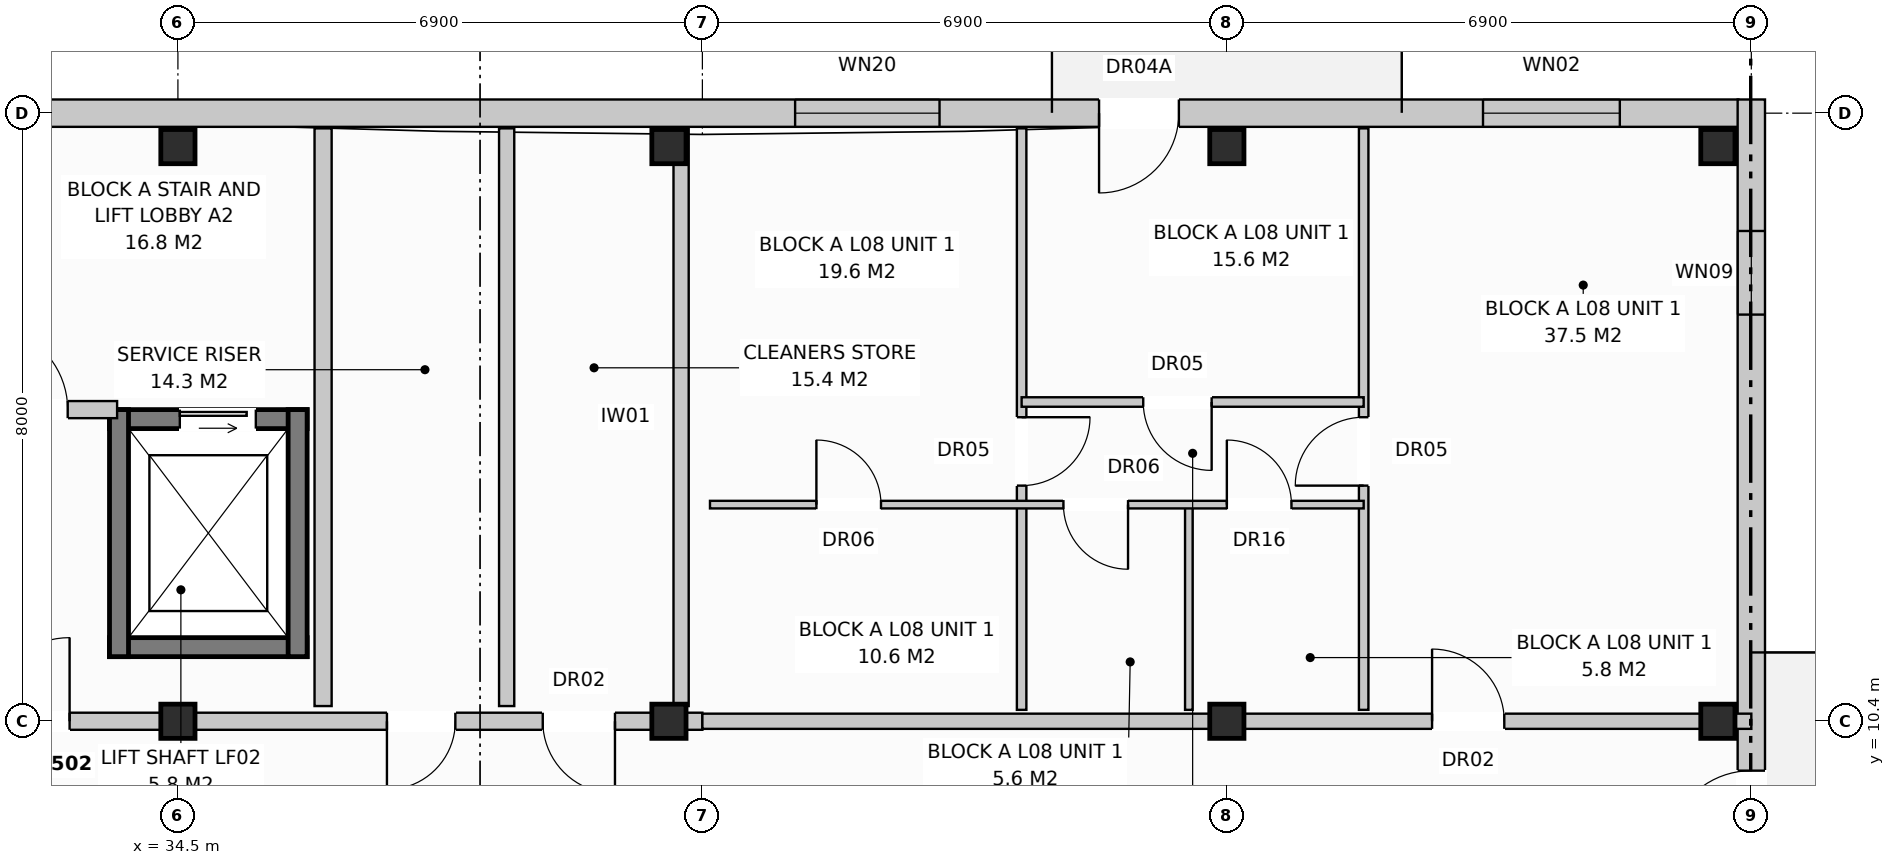
"""IFC4 building model, lengths in metres.
Left out: names, types, materials, properties, quantities, classifications, styles, units other than length and angle.
Written with IfcOpenShell. Run it as: python <this file> out.ifc"""

import sys

from ifc_helpers import new_model, si_unit, direction, frame, frame_2d, origin, origin_with_axes, origin_2d, place, context, subcontext, project, spatial, rectangle, extrude, element, fill, save


model = new_model("IFC4")
c1 = context("Model", 3, precision=1e-05, world=origin(), true_north=direction((0.0, 1.0)))
c2 = subcontext(c1, "Body", "Model", "MODEL_VIEW")
j1 = project(units=[si_unit("LENGTHUNIT", "METRE"), si_unit("PLANEANGLEUNIT", "RADIAN")], contexts=[c1])
p1 = place(None, origin())
s1 = spatial("IfcSite", under=j1, at=p1, CompositionType="ELEMENT")
p2 = place(p1, origin())
s2 = spatial("IfcBuilding", under=s1, at=p2, CompositionType="ELEMENT")
p3 = place(p2, frame((0.0, 0.0, 27.2)))
s3 = spatial("IfcBuildingStorey", under=s2, at=p3, CompositionType="ELEMENT", Elevation=27.2)
for number, where, z_axis, x_axis in (
    (1, (34.5, 10.4, 0.0), (0.0, 0.0, 1.0), (1.0, 0.0, 0.0)),
    (2, (34.5, 17.96, 0.0), (0.0, 0.0, 1.0), (1.0, 0.0, 0.0)),
    (3, (40.96, 10.4, 0.0), (0.0, 0.0, 1.0), (1.0, 0.0, 0.0)),
    (4, (40.96, 17.96, 0.0), (0.0, 0.0, 1.0), (1.0, 0.0, 0.0)),
    (5, (48.3, 10.4, 0.0), (0.0, 0.0, 1.0), (1.0, 0.0, 0.0)),
    (6, (48.3, 17.96, 0.0), (0.0, 0.0, 1.0), (1.0, 0.0, 0.0)),
    (7, (54.76, 10.4, 0.0), (0.0, 0.0, 1.0), (1.0, 0.0, 0.0)),
    (8, (54.76, 17.96, 0.0), (0.0, 0.0, 1.0), (1.0, 0.0, 0.0)),
):
    element("IfcColumn", number, at=place(p3, frame(where, z_axis=z_axis, x_axis=x_axis)), inside=s3, PredefinedType="COLUMN", context=c2, shape_type="SweptSolid", body=[
        extrude(rectangle(XDim=0.45, YDim=0.45, at=origin_2d()), origin(), (0.0, 0.0, 1.0), 3.2),
    ])
p4 = place(p3, frame((31.35, 18.4, 0.0), z_axis=(0.0, 0.0, 1.0), x_axis=(1.0, 0.0, 0.0)))
e9 = element("IfcWall", 9, at=p4, inside=s3, PredefinedType="STANDARD", context=c2, shape_type="SweptSolid", body=[
    extrude(rectangle(XDim=23.68, YDim=0.36, at=frame_2d((11.84, 0.0))), origin(), (0.0, 0.0, 1.0), 2.96),
])
p5 = place(p4, frame((15.269, 0.0, 0.0)))
e10 = element("IfcOpeningElement", 10, at=p5, cuts=e9, PredefinedType="OPENING", context=c2, shape_type="SweptSolid", body=[
    extrude(rectangle(XDim=1.05, YDim=2.12, at=frame_2d((0.525, 1.06))), frame((0.0, 0.192, 0.0), z_axis=(0.0, -1.0, 0.0), x_axis=(1.0, 0.0, 0.0)), (0.0, 0.0, 1.0), 0.384),
])
p6 = place(p4, frame((11.27, 0.0, 0.8)))
e11 = element("IfcOpeningElement", 11, at=p6, cuts=e9, PredefinedType="OPENING", context=c2, shape_type="SweptSolid", body=[
    extrude(rectangle(XDim=1.9, YDim=1.85, at=frame_2d((0.95, 0.925))), frame((0.0, 0.192, 0.0), z_axis=(0.0, -1.0, 0.0), x_axis=(1.0, 0.0, 0.0)), (0.0, 0.0, 1.0), 0.384),
])
p7 = place(p4, frame((20.32, 0.0, 0.8)))
e12 = element("IfcOpeningElement", 12, at=p7, cuts=e9, PredefinedType="OPENING", context=c2, shape_type="SweptSolid", body=[
    extrude(rectangle(XDim=1.8, YDim=1.7, at=frame_2d((0.9, 0.85))), frame((0.0, 0.192, 0.0), z_axis=(0.0, -1.0, 0.0), x_axis=(1.0, 0.0, 0.0)), (0.0, 0.0, 1.0), 0.384),
])
p8 = place(p3, frame((55.2, -0.18, 0.0), z_axis=(0.0, 0.0, 1.0), x_axis=(0.0, 1.0, 0.0)))
e13 = element("IfcWall", 13, at=p8, inside=s3, PredefinedType="STANDARD", context=c2, shape_type="SweptSolid", body=[
    extrude(rectangle(XDim=18.76, YDim=0.36, at=frame_2d((9.38, 0.0))), origin(), (0.0, 0.0, 1.0), 2.96),
])
p9 = place(p8, frame((8.83, 0.0, 0.0)))
e14 = element("IfcOpeningElement", 14, at=p9, cuts=e13, PredefinedType="OPENING", context=c2, shape_type="SweptSolid", body=[
    extrude(rectangle(XDim=1.1, YDim=2.1, at=frame_2d((0.55, 1.05))), frame((0.0, 0.192, 0.0), z_axis=(0.0, -1.0, 0.0), x_axis=(1.0, 0.0, 0.0)), (0.0, 0.0, 1.0), 0.384),
])
p10 = place(p8, frame((1.73, 0.0, 0.72)))
e15 = element("IfcOpeningElement", 15, at=p10, cuts=e13, PredefinedType="OPENING", context=c2, shape_type="SweptSolid", body=[
    extrude(rectangle(XDim=1.1, YDim=1.5, at=frame_2d((0.55, 0.75))), frame((0.0, 0.192, 0.0), z_axis=(0.0, -1.0, 0.0), x_axis=(1.0, 0.0, 0.0)), (0.0, 0.0, 1.0), 0.384),
])
p11 = place(p8, frame((15.93, 0.0, 0.72)))
e16 = element("IfcOpeningElement", 16, at=p11, cuts=e13, PredefinedType="OPENING", context=c2, shape_type="SweptSolid", body=[
    extrude(rectangle(XDim=1.1, YDim=1.5, at=frame_2d((0.55, 0.75))), frame((0.0, 0.192, 0.0), z_axis=(0.0, -1.0, 0.0), x_axis=(1.0, 0.0, 0.0)), (0.0, 0.0, 1.0), 0.384),
])
p12 = place(p3, frame((33.6, 14.375, 0.0), z_axis=(0.0, 0.0, 1.0), x_axis=(1.0, 0.0, 0.0)))
e17 = element("IfcWall", 17, at=p12, inside=s3, PredefinedType="SHEAR", context=c2, shape_type="SweptSolid", body=[
    extrude(rectangle(XDim=2.6, YDim=0.25, at=frame_2d((1.3, 0.0))), origin(), (0.0, 0.0, 1.0), 2.96),
])
p13 = place(p12, frame((0.925, 0.0, 0.0)))
e18 = element("IfcOpeningElement", 18, at=p13, cuts=e17, PredefinedType="OPENING", context=c2, shape_type="SweptSolid", body=[
    extrude(rectangle(XDim=1.0, YDim=2.1, at=frame_2d((0.5, 1.05))), frame((0.0, 0.137, 0.0), z_axis=(0.0, -1.0, 0.0), x_axis=(1.0, 0.0, 0.0)), (0.0, 0.0, 1.0), 0.274),
])
p14 = place(p3, frame((33.6, 11.375, 0.0), z_axis=(0.0, 0.0, 1.0), x_axis=(1.0, 0.0, 0.0)))
e19 = element("IfcWall", 19, at=p14, inside=s3, PredefinedType="SHEAR", context=c2, shape_type="SweptSolid", body=[
    extrude(rectangle(XDim=2.6, YDim=0.25, at=frame_2d((1.3, 0.0))), origin(), (0.0, 0.0, 1.0), 2.96),
])
for number, where, z_axis, x_axis in (
    (20, (33.725, 11.25, 0.0), (0.0, 0.0, 1.0), (0.0, 1.0, 0.0)),
    (21, (36.075, 11.25, 0.0), (0.0, 0.0, 1.0), (0.0, 1.0, 0.0)),
):
    element("IfcWall", number, at=place(p3, frame(where, z_axis=z_axis, x_axis=x_axis)), inside=s3, PredefinedType="SHEAR", context=c2, shape_type="SweptSolid", body=[
        extrude(rectangle(XDim=3.25, YDim=0.25, at=frame_2d((1.625, 0.0))), origin(), (0.0, 0.0, 1.0), 2.96),
    ])
p15 = place(p3, frame((36.41, 10.6, 0.0), z_axis=(0.0, 0.0, 1.0), x_axis=(0.0, 1.0, 0.0)))
e22 = element("IfcWall", 22, at=p15, inside=s3, PredefinedType="PARTITIONING", context=c2, shape_type="SweptSolid", body=[
    extrude(rectangle(XDim=7.6, YDim=0.225, at=frame_2d((3.8, 0.0))), origin(), (0.0, 0.0, 1.0), 2.59),
])
p16 = place(p3, frame((31.5, 14.5, 0.0), z_axis=(0.0, 0.0, 1.0), x_axis=(1.0, 0.0, 0.0)))
e23 = element("IfcWall", 23, at=p16, inside=s3, PredefinedType="PARTITIONING", context=c2, shape_type="SweptSolid", body=[
    extrude(rectangle(XDim=2.2, YDim=0.225, at=frame_2d((1.1, 0.0))), origin(), (0.0, 0.0, 1.0), 2.96),
])
p17 = place(p16, frame((0.45, 0.0, 0.0)))
e24 = element("IfcOpeningElement", 24, at=p17, cuts=e23, PredefinedType="OPENING", context=c2, shape_type="SweptSolid", body=[
    extrude(rectangle(XDim=1.1, YDim=2.15, at=frame_2d((0.55, 1.075))), frame((0.0, 0.125, 0.0), z_axis=(0.0, -1.0, 0.0), x_axis=(1.0, 0.0, 0.0)), (0.0, 0.0, 1.0), 0.249),
])
p18 = place(p3, frame((38.825, 10.6, 0.0), z_axis=(0.0, 0.0, 1.0), x_axis=(0.0, 1.0, 0.0)))
e25 = element("IfcWall", 25, at=p18, inside=s3, PredefinedType="PARTITIONING", context=c2, shape_type="SweptSolid", body=[
    extrude(rectangle(XDim=7.6, YDim=0.2, at=frame_2d((3.8, 0.0))), origin(), (0.0, 0.0, 1.0), 2.96),
])
p19 = place(p3, frame((41.12, 10.6, 0.0), z_axis=(0.0, 0.0, 1.0), x_axis=(0.0, 1.0, 0.0)))
e26 = element("IfcWall", 26, at=p19, inside=s3, PredefinedType="PARTITIONING", context=c2, shape_type="SweptSolid", body=[
    extrude(rectangle(XDim=7.6, YDim=0.2, at=frame_2d((3.8, 0.0))), origin(), (0.0, 0.0, 1.0), 2.4),
])
p20 = place(p3, frame((31.5, 10.4, 0.0), z_axis=(0.0, 0.0, 1.0), x_axis=(1.0, 0.0, 0.0)))
e27 = element("IfcWall", 27, at=p20, inside=s3, PredefinedType="PARTITIONING", context=c2, shape_type="SweptSolid", body=[
    extrude(rectangle(XDim=9.9, YDim=0.225, at=frame_2d((4.95, 0.0))), origin(), (0.0, 0.0, 1.0), 2.4),
])
p21 = place(p20, frame((0.475, 0.0, 0.0)))
e28 = element("IfcOpeningElement", 28, at=p21, cuts=e27, PredefinedType="OPENING", context=c2, shape_type="SweptSolid", body=[
    extrude(rectangle(XDim=1.1, YDim=2.15, at=frame_2d((0.55, 1.075))), frame((0.0, 0.125, 0.0), z_axis=(0.0, -1.0, 0.0), x_axis=(1.0, 0.0, 0.0)), (0.0, 0.0, 1.0), 0.249),
])
p22 = place(p20, frame((5.75, 0.0, 0.0)))
e29 = element("IfcOpeningElement", 29, at=p22, cuts=e27, PredefinedType="OPENING", context=c2, shape_type="SweptSolid", body=[
    extrude(rectangle(XDim=0.9, YDim=2.1, at=frame_2d((0.45, 1.05))), frame((0.0, 0.125, 0.0), z_axis=(0.0, -1.0, 0.0), x_axis=(1.0, 0.0, 0.0)), (0.0, 0.0, 1.0), 0.249),
])
p23 = place(p20, frame((7.8, 0.0, 0.0)))
e30 = element("IfcOpeningElement", 30, at=p23, cuts=e27, PredefinedType="OPENING", context=c2, shape_type="SweptSolid", body=[
    extrude(rectangle(XDim=0.95, YDim=2.15, at=frame_2d((0.475, 1.075))), frame((0.0, 0.125, 0.0), z_axis=(0.0, -1.0, 0.0), x_axis=(1.0, 0.0, 0.0)), (0.0, 0.0, 1.0), 0.249),
])
p24 = place(p3, frame((41.4, 10.4, 0.0), z_axis=(0.0, 0.0, 1.0), x_axis=(1.0, 0.0, 0.0)))
e31 = element("IfcWall", 31, at=p24, inside=s3, PredefinedType="PARTITIONING", context=c2, shape_type="SweptSolid", body=[
    extrude(rectangle(XDim=13.8, YDim=0.2, at=frame_2d((6.9, 0.0))), origin(), (0.0, 0.0, 1.0), 2.4),
])
p25 = place(p24, frame((9.6, 0.0, 0.0)))
e32 = element("IfcOpeningElement", 32, at=p25, cuts=e31, PredefinedType="OPENING", context=c2, shape_type="SweptSolid", body=[
    extrude(rectangle(XDim=0.95, YDim=2.15, at=frame_2d((0.475, 1.075))), frame((0.0, 0.112, 0.0), z_axis=(0.0, -1.0, 0.0), x_axis=(1.0, 0.0, 0.0)), (0.0, 0.0, 1.0), 0.224),
])
p26 = place(p3, frame((50.1, 10.55, 0.0), z_axis=(0.0, 0.0, 1.0), x_axis=(0.0, 1.0, 0.0)))
e33 = element("IfcWall", 33, at=p26, inside=s3, PredefinedType="PARTITIONING", context=c2, shape_type="SweptSolid", body=[
    extrude(rectangle(XDim=7.65, YDim=0.125, at=frame_2d((3.825, 0.0))), origin(), (0.0, 0.0, 1.0), 2.96),
])
p27 = place(p26, frame((2.95, 0.0, 0.0)))
e34 = element("IfcOpeningElement", 34, at=p27, cuts=e33, PredefinedType="OPENING", context=c2, shape_type="SweptSolid", body=[
    extrude(rectangle(XDim=0.9, YDim=2.1, at=frame_2d((0.45, 1.05))), frame((0.0, 0.074, 0.0), z_axis=(0.0, -1.0, 0.0), x_axis=(1.0, 0.0, 0.0)), (0.0, 0.0, 1.0), 0.149),
])
p28 = place(p3, frame((45.6, 10.55, 0.0), z_axis=(0.0, 0.0, 1.0), x_axis=(0.0, 1.0, 0.0)))
e35 = element("IfcWall", 35, at=p28, inside=s3, PredefinedType="PARTITIONING", context=c2, shape_type="SweptSolid", body=[
    extrude(rectangle(XDim=7.65, YDim=0.125, at=frame_2d((3.825, 0.0))), origin(), (0.0, 0.0, 1.0), 2.96),
])
p29 = place(p28, frame((2.95, 0.0, 0.0)))
e36 = element("IfcOpeningElement", 36, at=p29, cuts=e35, PredefinedType="OPENING", context=c2, shape_type="SweptSolid", body=[
    extrude(rectangle(XDim=0.9, YDim=2.1, at=frame_2d((0.45, 1.05))), frame((0.0, 0.074, 0.0), z_axis=(0.0, -1.0, 0.0), x_axis=(1.0, 0.0, 0.0)), (0.0, 0.0, 1.0), 0.149),
])
p30 = place(p3, frame((47.8, 10.55, 0.0), z_axis=(0.0, 0.0, 1.0), x_axis=(0.0, 1.0, 0.0)))
e37 = element("IfcWall", 37, at=p30, inside=s3, PredefinedType="PARTITIONING", context=c2, shape_type="SweptSolid", body=[
    extrude(rectangle(XDim=2.7, YDim=0.1, at=frame_2d((1.35, 0.0))), origin(), (0.0, 0.0, 1.0), 2.96),
])
p31 = place(p3, frame((41.5, 13.25, 0.0), z_axis=(0.0, 0.0, 1.0), x_axis=(1.0, 0.0, 0.0)))
e38 = element("IfcWall", 38, at=p31, inside=s3, PredefinedType="PARTITIONING", context=c2, shape_type="SweptSolid", body=[
    extrude(rectangle(XDim=8.6, YDim=0.1, at=frame_2d((4.3, 0.0))), origin(), (0.0, 0.0, 1.0), 2.96),
])
p32 = place(p31, frame((1.4, 0.0, 0.0)))
e39 = element("IfcOpeningElement", 39, at=p32, cuts=e38, PredefinedType="OPENING", context=c2, shape_type="SweptSolid", body=[
    extrude(rectangle(XDim=0.85, YDim=2.05, at=frame_2d((0.425, 1.025))), frame((0.0, 0.062, 0.0), z_axis=(0.0, -1.0, 0.0), x_axis=(1.0, 0.0, 0.0)), (0.0, 0.0, 1.0), 0.124),
])
p33 = place(p31, frame((4.65, 0.0, 0.0)))
e40 = element("IfcOpeningElement", 40, at=p33, cuts=e38, PredefinedType="OPENING", context=c2, shape_type="SweptSolid", body=[
    extrude(rectangle(XDim=0.85, YDim=2.05, at=frame_2d((0.425, 1.025))), frame((0.0, 0.062, 0.0), z_axis=(0.0, -1.0, 0.0), x_axis=(1.0, 0.0, 0.0)), (0.0, 0.0, 1.0), 0.124),
])
p34 = place(p31, frame((6.8, 0.0, 0.0)))
e41 = element("IfcOpeningElement", 41, at=p34, cuts=e38, PredefinedType="OPENING", context=c2, shape_type="SweptSolid", body=[
    extrude(rectangle(XDim=0.85, YDim=2.1, at=frame_2d((0.425, 1.05))), frame((0.0, 0.062, 0.0), z_axis=(0.0, -1.0, 0.0), x_axis=(1.0, 0.0, 0.0)), (0.0, 0.0, 1.0), 0.124),
])
p35 = place(p3, frame((45.6, 14.6, 0.0), z_axis=(0.0, 0.0, 1.0), x_axis=(1.0, 0.0, 0.0)))
e42 = element("IfcWall", 42, at=p35, inside=s3, PredefinedType="PARTITIONING", context=c2, shape_type="SweptSolid", body=[
    extrude(rectangle(XDim=4.5, YDim=0.125, at=frame_2d((2.25, 0.0))), origin(), (0.0, 0.0, 1.0), 2.96),
])
p36 = place(p35, frame((1.6, 0.0, 0.0)))
e43 = element("IfcOpeningElement", 43, at=p36, cuts=e42, PredefinedType="OPENING", context=c2, shape_type="SweptSolid", body=[
    extrude(rectangle(XDim=0.9, YDim=2.1, at=frame_2d((0.45, 1.05))), frame((0.0, 0.074, 0.0), z_axis=(0.0, -1.0, 0.0), x_axis=(1.0, 0.0, 0.0)), (0.0, 0.0, 1.0), 0.149),
])
p37 = place(p5, frame((1.05, 0.0, 0.0), z_axis=(0.0, 0.0, 1.0), x_axis=(-1.0, 0.0, 0.0)))
e44 = element("IfcDoor", 44, at=p37, inside=s3, OperationType="SINGLE_SWING_LEFT", PredefinedType="DOOR", context=c2, shape_type="SweptSolid", body=[
    extrude(rectangle(XDim=1.05, YDim=2.12, at=frame_2d((0.525, 1.06))), frame((0.0, 0.025, 0.0), z_axis=(0.0, -1.0, 0.0), x_axis=(1.0, 0.0, 0.0)), (0.0, 0.0, 1.0), 0.05),
])
fill(e10, e44)
p38 = place(p6, origin_with_axes())
e45 = element("IfcWindow", 45, at=p38, inside=s3, PartitioningType="SINGLE_PANEL", PredefinedType="WINDOW", context=c2, shape_type="SweptSolid", body=[
    extrude(rectangle(XDim=1.9, YDim=1.85, at=frame_2d((0.95, 0.925))), frame((0.0, 0.03, 0.0), z_axis=(0.0, -1.0, 0.0), x_axis=(1.0, 0.0, 0.0)), (0.0, 0.0, 1.0), 0.06),
])
fill(e11, e45)
p39 = place(p7, origin_with_axes())
e46 = element("IfcWindow", 46, at=p39, inside=s3, PartitioningType="SINGLE_PANEL", PredefinedType="WINDOW", context=c2, shape_type="SweptSolid", body=[
    extrude(rectangle(XDim=1.8, YDim=1.7, at=frame_2d((0.9, 0.85))), frame((0.0, 0.03, 0.0), z_axis=(0.0, -1.0, 0.0), x_axis=(1.0, 0.0, 0.0)), (0.0, 0.0, 1.0), 0.06),
])
fill(e12, e46)
p40 = place(p9, origin_with_axes())
e47 = element("IfcDoor", 47, at=p40, inside=s3, OperationType="SINGLE_SWING_LEFT", PredefinedType="DOOR", context=c2, shape_type="SweptSolid", body=[
    extrude(rectangle(XDim=1.1, YDim=2.1, at=frame_2d((0.55, 1.05))), frame((0.0, 0.025, 0.0), z_axis=(0.0, -1.0, 0.0), x_axis=(1.0, 0.0, 0.0)), (0.0, 0.0, 1.0), 0.05),
])
fill(e14, e47)
p41 = place(p11, origin_with_axes())
e48 = element("IfcWindow", 48, at=p41, inside=s3, PartitioningType="SINGLE_PANEL", PredefinedType="WINDOW", context=c2, shape_type="SweptSolid", body=[
    extrude(rectangle(XDim=1.1, YDim=1.5, at=frame_2d((0.55, 0.75))), frame((0.0, 0.03, 0.0), z_axis=(0.0, -1.0, 0.0), x_axis=(1.0, 0.0, 0.0)), (0.0, 0.0, 1.0), 0.06),
])
fill(e16, e48)
p42 = place(p13, origin_with_axes())
e49 = element("IfcDoor", 49, at=p42, inside=s3, OperationType="SLIDING_TO_LEFT", PredefinedType="DOOR", context=c2, shape_type="SweptSolid", body=[
    extrude(rectangle(XDim=1.0, YDim=2.1, at=frame_2d((0.5, 1.05))), frame((0.0, 0.025, 0.0), z_axis=(0.0, -1.0, 0.0), x_axis=(1.0, 0.0, 0.0)), (0.0, 0.0, 1.0), 0.05),
])
fill(e18, e49)
p43 = place(p17, origin_with_axes())
e50 = element("IfcDoor", 50, at=p43, inside=s3, OperationType="SINGLE_SWING_LEFT", PredefinedType="DOOR", context=c2, shape_type="SweptSolid", body=[
    extrude(rectangle(XDim=1.1, YDim=2.15, at=frame_2d((0.55, 1.075))), frame((0.0, 0.025, 0.0), z_axis=(0.0, -1.0, 0.0), x_axis=(1.0, 0.0, 0.0)), (0.0, 0.0, 1.0), 0.05),
])
fill(e24, e50)
p44 = place(p21, origin_with_axes())
e51 = element("IfcDoor", 51, at=p44, inside=s3, OperationType="SINGLE_SWING_RIGHT", PredefinedType="DOOR", context=c2, shape_type="SweptSolid", body=[
    extrude(rectangle(XDim=1.1, YDim=2.15, at=frame_2d((0.55, 1.075))), frame((0.0, 0.025, 0.0), z_axis=(0.0, -1.0, 0.0), x_axis=(1.0, 0.0, 0.0)), (0.0, 0.0, 1.0), 0.05),
])
fill(e28, e51)
p45 = place(p22, frame((0.9, 0.0, 0.0), z_axis=(0.0, 0.0, 1.0), x_axis=(-1.0, 0.0, 0.0)))
e52 = element("IfcDoor", 52, at=p45, inside=s3, OperationType="SINGLE_SWING_LEFT", PredefinedType="DOOR", context=c2, shape_type="SweptSolid", body=[
    extrude(rectangle(XDim=0.9, YDim=2.1, at=frame_2d((0.45, 1.05))), frame((0.0, 0.025, 0.0), z_axis=(0.0, -1.0, 0.0), x_axis=(1.0, 0.0, 0.0)), (0.0, 0.0, 1.0), 0.05),
])
fill(e29, e52)
p46 = place(p23, frame((0.95, 0.0, 0.0), z_axis=(0.0, 0.0, 1.0), x_axis=(-1.0, 0.0, 0.0)))
e53 = element("IfcDoor", 53, at=p46, inside=s3, OperationType="SINGLE_SWING_RIGHT", PredefinedType="DOOR", context=c2, shape_type="SweptSolid", body=[
    extrude(rectangle(XDim=0.95, YDim=2.15, at=frame_2d((0.475, 1.075))), frame((0.0, 0.025, 0.0), z_axis=(0.0, -1.0, 0.0), x_axis=(1.0, 0.0, 0.0)), (0.0, 0.0, 1.0), 0.05),
])
fill(e30, e53)
p47 = place(p25, origin_with_axes())
e54 = element("IfcDoor", 54, at=p47, inside=s3, OperationType="SINGLE_SWING_LEFT", PredefinedType="DOOR", context=c2, shape_type="SweptSolid", body=[
    extrude(rectangle(XDim=0.95, YDim=2.15, at=frame_2d((0.475, 1.075))), frame((0.0, 0.025, 0.0), z_axis=(0.0, -1.0, 0.0), x_axis=(1.0, 0.0, 0.0)), (0.0, 0.0, 1.0), 0.05),
])
fill(e32, e54)
p48 = place(p27, origin_with_axes())
e55 = element("IfcDoor", 55, at=p48, inside=s3, OperationType="SINGLE_SWING_LEFT", PredefinedType="DOOR", context=c2, shape_type="SweptSolid", body=[
    extrude(rectangle(XDim=0.9, YDim=2.1, at=frame_2d((0.45, 1.05))), frame((0.0, 0.025, 0.0), z_axis=(0.0, -1.0, 0.0), x_axis=(1.0, 0.0, 0.0)), (0.0, 0.0, 1.0), 0.05),
])
fill(e34, e55)
p49 = place(p29, frame((0.9, 0.0, 0.0), z_axis=(0.0, 0.0, 1.0), x_axis=(-1.0, 0.0, 0.0)))
e56 = element("IfcDoor", 56, at=p49, inside=s3, OperationType="SINGLE_SWING_RIGHT", PredefinedType="DOOR", context=c2, shape_type="SweptSolid", body=[
    extrude(rectangle(XDim=0.9, YDim=2.1, at=frame_2d((0.45, 1.05))), frame((0.0, 0.025, 0.0), z_axis=(0.0, -1.0, 0.0), x_axis=(1.0, 0.0, 0.0)), (0.0, 0.0, 1.0), 0.05),
])
fill(e36, e56)
p50 = place(p32, origin_with_axes())
e57 = element("IfcDoor", 57, at=p50, inside=s3, OperationType="SINGLE_SWING_LEFT", PredefinedType="DOOR", context=c2, shape_type="SweptSolid", body=[
    extrude(rectangle(XDim=0.85, YDim=2.05, at=frame_2d((0.425, 1.025))), frame((0.0, 0.025, 0.0), z_axis=(0.0, -1.0, 0.0), x_axis=(1.0, 0.0, 0.0)), (0.0, 0.0, 1.0), 0.05),
])
fill(e39, e57)
p51 = place(p33, frame((0.85, 0.0, 0.0), z_axis=(0.0, 0.0, 1.0), x_axis=(-1.0, 0.0, 0.0)))
e58 = element("IfcDoor", 58, at=p51, inside=s3, OperationType="SINGLE_SWING_RIGHT", PredefinedType="DOOR", context=c2, shape_type="SweptSolid", body=[
    extrude(rectangle(XDim=0.85, YDim=2.05, at=frame_2d((0.425, 1.025))), frame((0.0, 0.025, 0.0), z_axis=(0.0, -1.0, 0.0), x_axis=(1.0, 0.0, 0.0)), (0.0, 0.0, 1.0), 0.05),
])
fill(e40, e58)
p52 = place(p34, origin_with_axes())
e59 = element("IfcDoor", 59, at=p52, inside=s3, OperationType="SINGLE_SWING_LEFT", PredefinedType="DOOR", context=c2, shape_type="SweptSolid", body=[
    extrude(rectangle(XDim=0.85, YDim=2.1, at=frame_2d((0.425, 1.05))), frame((0.0, 0.025, 0.0), z_axis=(0.0, -1.0, 0.0), x_axis=(1.0, 0.0, 0.0)), (0.0, 0.0, 1.0), 0.05),
])
fill(e41, e59)
p53 = place(p36, frame((0.9, 0.0, 0.0), z_axis=(0.0, 0.0, 1.0), x_axis=(-1.0, 0.0, 0.0)))
e60 = element("IfcDoor", 60, at=p53, inside=s3, OperationType="SINGLE_SWING_RIGHT", PredefinedType="DOOR", context=c2, shape_type="SweptSolid", body=[
    extrude(rectangle(XDim=0.9, YDim=2.1, at=frame_2d((0.45, 1.05))), frame((0.0, 0.025, 0.0), z_axis=(0.0, -1.0, 0.0), x_axis=(1.0, 0.0, 0.0)), (0.0, 0.0, 1.0), 0.05),
])
fill(e43, e60)
save(model, sys.argv[1])
